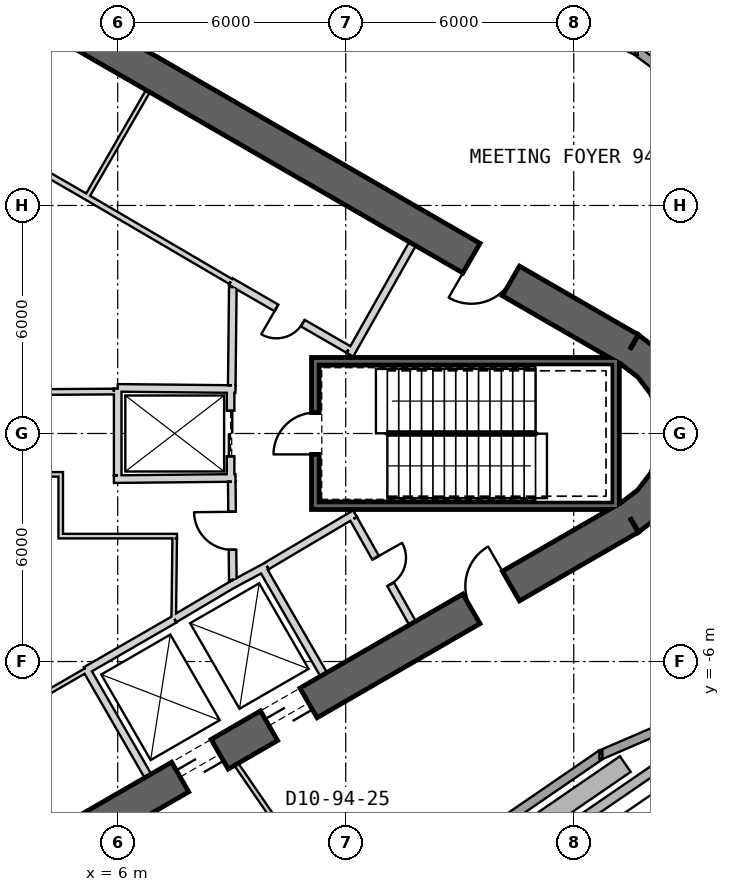
"""IFC4 building model, lengths in metres.
Left out: names, types, materials, properties, quantities, classifications, styles, units other than length and angle.
Written with IfcOpenShell. Run it as: python <this file> out.ifc"""

import sys

from ifc_helpers import new_model, si_unit, direction, frame, frame_2d, origin, place, context, subcontext, project, spatial, polyline, rectangle, outline, extrude, element, fill, save


model = new_model("IFC4")
c1 = context("Model", 3, precision=1e-05, world=origin(), true_north=direction((0.0, 1.0)))
c2 = subcontext(c1, "Body", "Model", "MODEL_VIEW")
j1 = project(units=[si_unit("LENGTHUNIT", "METRE"), si_unit("PLANEANGLEUNIT", "RADIAN")], contexts=[c1])
p1 = place(None, origin())
s1 = spatial("IfcSite", under=j1, at=p1, CompositionType="ELEMENT")
p2 = place(p1, origin())
s2 = spatial("IfcBuilding", under=s1, at=p2, CompositionType="ELEMENT")
p3 = place(p2, frame((0.0, 0.0, 415.3)))
s3 = spatial("IfcBuildingStorey", under=s2, at=p3, CompositionType="ELEMENT", Elevation=415.3)
p4 = place(p3, frame((19.475, 2.208, 0.0), z_axis=(0.0, 0.0, 1.0), x_axis=(-0.866028369851, 0.499994862586, 0.0)))
e1 = element("IfcWall", 1, at=p4, inside=s3, PredefinedType="SHEAR", context=c2, shape_type="SweptSolid", body=[
    extrude(rectangle(XDim=31.523, YDim=0.9, at=frame_2d((15.762, 0.0))), origin(), (0.0, 0.0, 1.0), 5.0),
])
p5 = place(p4, frame((3.612, 0.0, 0.0)))
e2 = element("IfcOpeningElement", 2, at=p5, cuts=e1, PredefinedType="OPENING", context=c2, shape_type="SweptSolid", body=[
    extrude(rectangle(XDim=1.2, YDim=2.4, at=frame_2d((0.6, 1.2))), frame((0.0, 0.46, 0.0), z_axis=(0.0, -1.0, 0.0), x_axis=(1.0, 0.0, 0.0)), (0.0, 0.0, 1.0), 0.92),
])
p6 = place(p4, frame((26.712, 0.0, 0.0)))
e3 = element("IfcOpeningElement", 3, at=p6, cuts=e1, PredefinedType="OPENING", context=c2, shape_type="SweptSolid", body=[
    extrude(rectangle(XDim=1.2, YDim=2.4, at=frame_2d((0.6, 1.2))), frame((0.0, 0.46, 0.0), z_axis=(0.0, -1.0, 0.0), x_axis=(1.0, 0.0, 0.0)), (0.0, 0.0, 1.0), 0.92),
])
p7 = place(p3, frame((-7.825, -17.97, 0.0), z_axis=(0.0, 0.0, 1.0), x_axis=(0.866028369851, 0.499994862586, 0.0)))
e4 = element("IfcWall", 4, at=p7, inside=s3, PredefinedType="SHEAR", context=c2, shape_type="SweptSolid", body=[
    extrude(rectangle(XDim=31.523, YDim=0.9, at=frame_2d((15.762, 0.0))), origin(), (0.0, 0.0, 1.0), 5.0),
])
p8 = place(p7, frame((17.862, 0.0, 0.0)))
e5 = element("IfcOpeningElement", 5, at=p8, cuts=e4, PredefinedType="OPENING", context=c2, shape_type="SweptSolid", body=[
    extrude(rectangle(XDim=1.2, YDim=2.4, at=frame_2d((0.6, 1.2))), frame((0.0, 0.46, 0.0), z_axis=(0.0, -1.0, 0.0), x_axis=(1.0, 0.0, 0.0)), (0.0, 0.0, 1.0), 0.92),
])
p9 = place(p7, frame((20.562, 0.0, 0.0)))
e6 = element("IfcOpeningElement", 6, at=p9, cuts=e4, PredefinedType="OPENING", context=c2, shape_type="SweptSolid", body=[
    extrude(rectangle(XDim=1.2, YDim=2.4, at=frame_2d((0.6, 1.2))), frame((0.0, 0.46, 0.0), z_axis=(0.0, -1.0, 0.0), x_axis=(1.0, 0.0, 0.0)), (0.0, 0.0, 1.0), 0.92),
])
p10 = place(p7, frame((26.712, 0.0, 0.0)))
e7 = element("IfcOpeningElement", 7, at=p10, cuts=e4, PredefinedType="OPENING", context=c2, shape_type="SweptSolid", body=[
    extrude(rectangle(XDim=1.2, YDim=2.4, at=frame_2d((0.6, 1.2))), frame((0.0, 0.46, 0.0), z_axis=(0.0, -1.0, 0.0), x_axis=(1.0, 0.0, 0.0)), (0.0, 0.0, 1.0), 0.92),
])
p11 = place(p7, frame((3.612, 0.0, 0.0)))
e8 = element("IfcOpeningElement", 8, at=p11, cuts=e4, PredefinedType="OPENING", context=c2, shape_type="SweptSolid", body=[
    extrude(rectangle(XDim=1.2, YDim=2.4, at=frame_2d((0.6, 1.2))), frame((0.0, 0.46, 0.0), z_axis=(0.0, -1.0, 0.0), x_axis=(1.0, 0.0, 0.0)), (0.0, 0.0, 1.0), 0.92),
])
p12 = place(p3, origin())
e9 = element("IfcWall", 9, at=p12, inside=s3, PredefinedType="SHEAR", context=c2, shape_type="SweptSolid", body=[
    extrude(outline(polyline([(19.7, -2.598), (20.321, -2.121), (20.798, -1.5), (21.098, -0.777), (21.2, 0.0), (21.098, 0.777), (20.798, 1.5), (20.321, 2.121), (19.7, 2.598), (19.25, 1.819), (19.685, 1.485), (20.019, 1.05), (20.229, 0.543), (20.3, 0.0), (20.229, -0.543), (20.019, -1.05), (19.685, -1.485), (19.25, -1.819), (19.7, -2.598)])), origin(), (0.0, 0.0, 1.0), 5.0),
])
p13 = place(p3, frame((26.079, 5.284, 0.0), z_axis=(0.0, 0.0, 1.0), x_axis=(-0.801990053173, 0.597337387589, 0.0)))
e10 = element("IfcWall", 10, at=p13, inside=s3, PredefinedType="SOLIDWALL", context=c2, shape_type="SweptSolid", body=[
    extrude(rectangle(XDim=8.02, YDim=0.24, at=frame_2d((4.01, 0.0))), origin(), (0.0, 0.0, 1.0), 4.75),
])
p14 = place(p3, frame((19.647, 10.075, 0.0), z_axis=(0.0, 0.0, 1.0), x_axis=(-0.902321568676, 0.431063552974, 0.0)))
e11 = element("IfcWall", 11, at=p14, inside=s3, PredefinedType="SOLIDWALL", context=c2, shape_type="SweptSolid", body=[
    extrude(rectangle(XDim=8.024, YDim=0.24, at=frame_2d((4.012, 0.0))), origin(), (0.0, 0.0, 1.0), 4.75),
])
p15 = place(p3, frame((-1.098, -22.052, 0.0), z_axis=(0.0, 0.0, 1.0), x_axis=(0.824476827337, 0.565895715821, 0.0)))
e12 = element("IfcWall", 12, at=p15, inside=s3, PredefinedType="SOLIDWALL", context=c2, shape_type="SweptSolid", body=[
    extrude(rectangle(XDim=24.031, YDim=0.24, at=frame_2d((12.016, 0.0))), origin(), (0.0, 0.0, 1.0), 4.75),
])
p16 = place(p3, frame((18.716, -8.453, 0.0), z_axis=(0.0, 0.0, 1.0), x_axis=(0.91830312374, 0.395877977323, 0.0)))
e13 = element("IfcWall", 13, at=p16, inside=s3, PredefinedType="SOLIDWALL", context=c2, shape_type="SweptSolid", body=[
    extrude(rectangle(XDim=8.03, YDim=0.24, at=frame_2d((4.015, 0.0))), origin(), (0.0, 0.0, 1.0), 4.75),
])
p17 = place(p3, frame((20.109, -8.849, 0.04), z_axis=(0.0, 0.0, 1.0), x_axis=(-0.824476642241, -0.565895985494, 0.0)))
e14 = element("IfcWall", 14, at=p17, inside=s3, PredefinedType="PARAPET", context=c2, shape_type="SweptSolid", body=[
    extrude(rectangle(XDim=26.04, YDim=0.25, at=frame_2d((13.02, 0.0))), origin(), (0.0, 0.0, 1.0), 1.2),
])
p18 = place(p3, frame((19.357, -8.698, 0.04), z_axis=(0.0, 0.0, 1.0), x_axis=(-0.824477152259, -0.565895242428, 0.0)))
e15 = element("IfcWall", 15, at=p18, inside=s3, PredefinedType="PARAPET", context=c2, shape_type="SweptSolid", body=[
    extrude(rectangle(XDim=24.864, YDim=0.5, at=frame_2d((12.432, 0.0))), origin(), (0.0, 0.0, 1.0), 0.6),
])
p19 = place(p3, frame((6.795, -9.01, 0.0), z_axis=(0.0, 0.0, 1.0), x_axis=(-0.499984717929, 0.866034226713, 0.0)))
e16 = element("IfcWall", 16, at=p19, inside=s3, PredefinedType="PLUMBINGWALL", context=c2, shape_type="SweptSolid", body=[
    extrude(rectangle(XDim=3.25, YDim=0.2, at=frame_2d((1.625, 0.0))), origin(), (0.0, 0.0, 1.0), 4.75),
])
p20 = place(p3, frame((5.159, -6.236, 0.0), z_axis=(0.0, 0.0, 1.0), x_axis=(0.866036505625, 0.499980770555, 0.0)))
e17 = element("IfcWall", 17, at=p20, inside=s3, PredefinedType="PLUMBINGWALL", context=c2, shape_type="SweptSolid", body=[
    extrude(rectangle(XDim=2.7, YDim=0.2, at=frame_2d((1.35, 0.0))), origin(), (0.0, 0.0, 1.0), 4.75),
])
p21 = place(p3, frame((9.795, -3.525, 0.0), z_axis=(0.0, 0.0, 1.0), x_axis=(0.499984717929, -0.866034226713, 0.0)))
e18 = element("IfcWall", 18, at=p21, inside=s3, PredefinedType="PLUMBINGWALL", context=c2, shape_type="SweptSolid", body=[
    extrude(rectangle(XDim=3.25, YDim=0.2, at=frame_2d((1.625, 0.0))), origin(), (0.0, 0.0, 1.0), 4.75),
])
p22 = place(p3, frame((8.974, -3.999, 0.0), z_axis=(0.0, 0.0, 1.0), x_axis=(0.880907015104, 0.473289373154, 0.0)))
e19 = element("IfcWall", 19, at=p22, inside=s3, PredefinedType="PLUMBINGWALL", context=c2, shape_type="SweptSolid", body=[
    extrude(rectangle(XDim=1.078, YDim=0.2, at=frame_2d((0.539, 0.0))), origin(), (0.0, 0.0, 1.0), 4.75),
])
p23 = place(p3, frame((7.493, -4.878, 0.0), z_axis=(0.0, 0.0, 1.0), x_axis=(0.859981807212, 0.510324691999, 0.0)))
e20 = element("IfcWall", 20, at=p23, inside=s3, PredefinedType="PLUMBINGWALL", context=c2, shape_type="SweptSolid", body=[
    extrude(rectangle(XDim=1.845, YDim=0.2, at=frame_2d((0.922, 0.0))), origin(), (0.0, 0.0, 1.0), 4.75),
])
p24 = place(p3, frame((19.2, 1.9, -0.25), z_axis=(0.0, 0.0, 1.0), x_axis=(-1.0, 0.0, 0.0)))
e21 = element("IfcWall", 21, at=p24, inside=s3, PredefinedType="SHEAR", context=c2, shape_type="SweptSolid", body=[
    extrude(rectangle(XDim=8.1, YDim=0.2, at=frame_2d((4.05, 0.0))), origin(), (0.0, 0.0, 1.0), 5.0),
])
p25 = place(p3, frame((19.1, -2.0, -0.25), z_axis=(0.0, 0.0, 1.0), x_axis=(0.0, 1.0, 0.0)))
e22 = element("IfcWall", 22, at=p25, inside=s3, PredefinedType="SHEAR", context=c2, shape_type="SweptSolid", body=[
    extrude(rectangle(XDim=3.8, YDim=0.2, at=frame_2d((1.9, 0.0))), origin(), (0.0, 0.0, 1.0), 5.0),
])
p26 = place(p3, frame((11.1, -1.9, -0.25), z_axis=(0.0, 0.0, 1.0), x_axis=(1.0, 0.0, 0.0)))
e23 = element("IfcWall", 23, at=p26, inside=s3, PredefinedType="SHEAR", context=c2, shape_type="SweptSolid", body=[
    extrude(rectangle(XDim=7.9, YDim=0.2, at=frame_2d((3.95, 0.0))), origin(), (0.0, 0.0, 1.0), 5.0),
])
p27 = place(p3, frame((11.2, -1.8, -0.25), z_axis=(0.0, 0.0, 1.0), x_axis=(0.0, 1.0, 0.0)))
e24 = element("IfcWall", 24, at=p27, inside=s3, PredefinedType="SHEAR", context=c2, shape_type="SweptSolid", body=[
    extrude(rectangle(XDim=3.6, YDim=0.2, at=frame_2d((1.8, 0.0))), origin(), (0.0, 0.0, 1.0), 5.0),
])
p28 = place(p27, frame((1.25, 0.0, 0.25)))
e25 = element("IfcOpeningElement", 25, at=p28, cuts=e24, PredefinedType="OPENING", context=c2, shape_type="SweptSolid", body=[
    extrude(rectangle(XDim=1.1, YDim=2.1, at=frame_2d((0.55, 1.05))), frame((0.0, 0.11, 0.0), z_axis=(0.0, -1.0, 0.0), x_axis=(1.0, 0.0, 0.0)), (0.0, 0.0, 1.0), 0.22),
])
p29 = place(p3, frame((8.97, 1.2, 0.0), z_axis=(0.0, 0.0, 1.0), x_axis=(0.0, -1.0, 0.0)))
e26 = element("IfcWall", 26, at=p29, inside=s3, PredefinedType="PLUMBINGWALL", context=c2, shape_type="SweptSolid", body=[
    extrude(rectangle(XDim=2.4, YDim=0.2, at=frame_2d((1.2, 0.0))), origin(), (0.0, 0.0, 1.0), 4.75),
])
p30 = place(p29, frame((0.6, 0.0, 0.0)))
e27 = element("IfcOpeningElement", 27, at=p30, cuts=e26, PredefinedType="OPENING", context=c2, shape_type="SweptSolid", body=[
    extrude(rectangle(XDim=1.2, YDim=2.4, at=frame_2d((0.6, 1.2))), frame((0.0, 0.11, 0.0), z_axis=(0.0, -1.0, 0.0), x_axis=(1.0, 0.0, 0.0)), (0.0, 0.0, 1.0), 0.22),
])
p31 = place(p3, frame((6.0, 1.2, 0.0), z_axis=(0.0, 0.0, 1.0), x_axis=(0.999949988, -0.010001074852, 0.0)))
e28 = element("IfcWall", 28, at=p31, inside=s3, PredefinedType="PLUMBINGWALL", context=c2, shape_type="SweptSolid", body=[
    extrude(rectangle(XDim=3.1, YDim=0.2, at=frame_2d((1.55, 0.0))), origin(), (0.0, 0.0, 1.0), 4.75),
])
p32 = place(p3, frame((5.9, -1.201, 0.0), z_axis=(0.0, 0.0, 1.0), x_axis=(0.999950064753, 0.009993397809, 0.0)))
e29 = element("IfcWall", 29, at=p32, inside=s3, PredefinedType="PLUMBINGWALL", context=c2, shape_type="SweptSolid", body=[
    extrude(rectangle(XDim=3.2, YDim=0.2, at=frame_2d((1.6, 0.0))), origin(), (0.0, 0.0, 1.0), 4.75),
])
p33 = place(p3, frame((6.0, -1.1, 0.0), z_axis=(0.0, 0.0, 1.0), x_axis=(0.0, 1.0, 0.0)))
e30 = element("IfcWall", 30, at=p33, inside=s3, PredefinedType="PLUMBINGWALL", context=c2, shape_type="SweptSolid", body=[
    extrude(rectangle(XDim=2.28, YDim=0.2, at=frame_2d((1.14, 0.0))), origin(), (0.0, 0.0, 1.0), 4.75),
])
p34 = place(p3, frame((6.795, 9.01, 0.0), z_axis=(0.0, 0.0, 1.0), x_axis=(-0.499984717929, -0.866034226713, 0.0)))
e31 = element("IfcWall", 31, at=p34, inside=s3, PredefinedType="PARTITIONING", context=c2, shape_type="SweptSolid", body=[
    extrude(rectangle(XDim=3.25, YDim=0.12, at=frame_2d((1.625, 0.0))), origin(), (0.0, 0.0, 1.0), 4.75),
])
p35 = place(p3, frame((12.11, 2.073, 0.0), z_axis=(0.0, 0.0, 1.0), x_axis=(0.49196600604, 0.870614408852, 0.0)))
e32 = element("IfcWall", 32, at=p35, inside=s3, PredefinedType="PARTITIONING", context=c2, shape_type="SweptSolid", body=[
    extrude(rectangle(XDim=3.35, YDim=0.2, at=frame_2d((1.675, 0.0))), origin(), (0.0, 0.0, 1.0), 4.75),
])
p36 = place(p3, frame((8.974, 3.999, 0.0), z_axis=(0.0, 0.0, 1.0), x_axis=(0.86601284211, -0.500021756827, 0.0)))
e33 = element("IfcWall", 33, at=p36, inside=s3, PredefinedType="PARTITIONING", context=c2, shape_type="SweptSolid", body=[
    extrude(rectangle(XDim=3.577, YDim=0.2, at=frame_2d((1.789, 0.0))), origin(), (0.0, 0.0, 1.0), 4.75),
])
p37 = place(p36, frame((1.389, 0.0, 0.0)))
e34 = element("IfcOpeningElement", 34, at=p37, cuts=e33, PredefinedType="OPENING", context=c2, shape_type="SweptSolid", body=[
    extrude(rectangle(XDim=0.8, YDim=2.1, at=frame_2d((0.4, 1.05))), frame((0.0, 0.11, 0.0), z_axis=(0.0, -1.0, 0.0), x_axis=(1.0, 0.0, 0.0)), (0.0, 0.0, 1.0), 0.22),
])
p38 = place(p3, frame((8.974, 3.999, 0.0), z_axis=(0.0, 0.0, 1.0), x_axis=(-0.862665579, 0.505774751059, 0.0)))
e35 = element("IfcWall", 35, at=p38, inside=s3, PredefinedType="PLUMBINGWALL", context=c2, shape_type="SweptSolid", body=[
    extrude(rectangle(XDim=4.423, YDim=0.15, at=frame_2d((2.211, 0.0))), origin(), (0.0, 0.0, 1.0), 4.75),
])
p39 = place(p3, frame((5.159, 6.236, 0.0), z_axis=(0.0, 0.0, 1.0), x_axis=(-0.866028230842, 0.499995103361, 0.0)))
e36 = element("IfcWall", 36, at=p39, inside=s3, PredefinedType="PLUMBINGWALL", context=c2, shape_type="SweptSolid", body=[
    extrude(rectangle(XDim=5.4, YDim=0.15, at=frame_2d((2.7, 0.0))), origin(), (0.0, 0.0, 1.0), 4.75),
])
p40 = place(p39, frame((2.3, 0.0, 0.0)))
e37 = element("IfcOpeningElement", 37, at=p40, cuts=e36, PredefinedType="OPENING", context=c2, shape_type="SweptSolid", body=[
    extrude(rectangle(XDim=0.8, YDim=2.1, at=frame_2d((0.4, 1.05))), frame((0.0, 0.085, 0.0), z_axis=(0.0, -1.0, 0.0), x_axis=(1.0, 0.0, 0.0)), (0.0, 0.0, 1.0), 0.17),
])
p41 = place(p3, frame((0.483, -8.936, 0.0), z_axis=(0.0, 0.0, 1.0), x_axis=(0.866028230842, 0.499995103361, 0.0)))
e38 = element("IfcWall", 38, at=p41, inside=s3, PredefinedType="PARTITIONING", context=c2, shape_type="SweptSolid", body=[
    extrude(rectangle(XDim=5.4, YDim=0.12, at=frame_2d((2.7, 0.0))), origin(), (0.0, 0.0, 1.0), 4.75),
])
p42 = place(p41, frame((2.3, 0.0, 0.0)))
e39 = element("IfcOpeningElement", 39, at=p42, cuts=e38, PredefinedType="OPENING", context=c2, shape_type="SweptSolid", body=[
    extrude(rectangle(XDim=0.8, YDim=2.1, at=frame_2d((0.4, 1.05))), frame((0.0, 0.07, 0.0), z_axis=(0.0, -1.0, 0.0), x_axis=(1.0, 0.0, 0.0)), (0.0, 0.0, 1.0), 0.14),
])
p43 = place(p3, frame((12.245, -2.109, 0.0), z_axis=(0.0, 0.0, 1.0), x_axis=(-0.860414880418, -0.509594185166, 0.0)))
e40 = element("IfcWall", 40, at=p43, inside=s3, PredefinedType="PARTITIONING", context=c2, shape_type="SweptSolid", body=[
    extrude(rectangle(XDim=2.7, YDim=0.2, at=frame_2d((1.35, 0.0))), origin(), (0.0, 0.0, 1.0), 4.75),
])
p44 = place(p3, frame((13.758, -4.99, 0.0), z_axis=(0.0, 0.0, 1.0), x_axis=(-0.491993409184, 0.87059892334, 0.0)))
e41 = element("IfcWall", 41, at=p44, inside=s3, PredefinedType="PARTITIONING", context=c2, shape_type="SweptSolid", body=[
    extrude(rectangle(XDim=3.15, YDim=0.2, at=frame_2d((1.575, 0.0))), origin(), (0.0, 0.0, 1.0), 4.75),
])
p45 = place(p44, frame((1.175, 0.0, 0.0)))
e42 = element("IfcOpeningElement", 42, at=p45, cuts=e41, PredefinedType="OPENING", context=c2, shape_type="SweptSolid", body=[
    extrude(rectangle(XDim=0.8, YDim=2.1, at=frame_2d((0.4, 1.05))), frame((0.0, 0.11, 0.0), z_axis=(0.0, -1.0, 0.0), x_axis=(1.0, 0.0, 0.0)), (0.0, 0.0, 1.0), 0.22),
])
p46 = place(p3, frame((9.001, 1.27, 0.0), z_axis=(0.0, 0.0, 1.0), x_axis=(0.010780534828, 0.999941888346, 0.0)))
e43 = element("IfcWall", 43, at=p46, inside=s3, PredefinedType="PARTITIONING", context=c2, shape_type="SweptSolid", body=[
    extrude(rectangle(XDim=2.582, YDim=0.2, at=frame_2d((1.291, 0.0))), origin(), (0.0, 0.0, 1.0), 4.75),
])
p47 = place(p3, frame((9.029, -3.851, 0.0), z_axis=(0.0, 0.0, 1.0), x_axis=(-0.010783593937, 0.99994185536, 0.0)))
e44 = element("IfcWall", 44, at=p47, inside=s3, PredefinedType="PARTITIONING", context=c2, shape_type="SweptSolid", body=[
    extrude(rectangle(XDim=2.581, YDim=0.2, at=frame_2d((1.291, 0.0))), origin(), (0.0, 0.0, 1.0), 4.75),
])
p48 = place(p47, frame((0.791, 0.0, 0.0)))
e45 = element("IfcOpeningElement", 45, at=p48, cuts=e44, PredefinedType="OPENING", context=c2, shape_type="SweptSolid", body=[
    extrude(rectangle(XDim=1.0, YDim=2.1, at=frame_2d((0.5, 1.05))), frame((0.0, 0.11, 0.0), z_axis=(0.0, -1.0, 0.0), x_axis=(1.0, 0.0, 0.0)), (0.0, 0.0, 1.0), 0.22),
])
p49 = place(p3, frame((1.388, 1.074, 0.0), z_axis=(0.0, 0.0, 1.0), x_axis=(0.99997856967, 0.006546770205, 0.0)))
e46 = element("IfcWall", 46, at=p49, inside=s3, PredefinedType="PLUMBINGWALL", context=c2, shape_type="SweptSolid", body=[
    extrude(rectangle(XDim=4.512, YDim=0.15, at=frame_2d((2.256, 0.0))), origin(), (0.0, 0.0, 1.0), 4.75),
])
p50 = place(p49, frame((1.92, 0.0, 0.0)))
e47 = element("IfcOpeningElement", 47, at=p50, cuts=e46, PredefinedType="OPENING", context=c2, shape_type="SweptSolid", body=[
    extrude(rectangle(XDim=0.8, YDim=2.1, at=frame_2d((0.4, 1.05))), frame((0.0, 0.085, 0.0), z_axis=(0.0, -1.0, 0.0), x_axis=(1.0, 0.0, 0.0)), (0.0, 0.0, 1.0), 0.17),
])
p51 = place(p3, frame((4.56, -1.075, 0.0), z_axis=(0.0, 0.0, 1.0), x_axis=(-1.0, 0.0, 0.0)))
e48 = element("IfcWall", 48, at=p51, inside=s3, PredefinedType="PARTITIONING", context=c2, shape_type="SweptSolid", body=[
    extrude(rectangle(XDim=3.026, YDim=0.12, at=frame_2d((1.513, 0.0))), origin(), (0.0, 0.0, 1.0), 4.75),
])
p52 = place(p3, frame((4.5, -2.76, 0.0), z_axis=(0.0, 0.0, 1.0), x_axis=(0.0, 1.0, 0.0)))
e49 = element("IfcWall", 49, at=p52, inside=s3, PredefinedType="PARTITIONING", context=c2, shape_type="SweptSolid", body=[
    extrude(rectangle(XDim=1.625, YDim=0.12, at=frame_2d((0.812, 0.0))), origin(), (0.0, 0.0, 1.0), 4.75),
])
p53 = place(p3, frame((7.56, -2.7, 0.0), z_axis=(0.0, 0.0, 1.0), x_axis=(-1.0, 0.0, 0.0)))
e50 = element("IfcWall", 50, at=p53, inside=s3, PredefinedType="PARTITIONING", context=c2, shape_type="SweptSolid", body=[
    extrude(rectangle(XDim=3.0, YDim=0.12, at=frame_2d((1.5, 0.0))), origin(), (0.0, 0.0, 1.0), 4.75),
])
p54 = place(p3, frame((7.475, -4.865, 0.0), z_axis=(0.0, 0.0, 1.0), x_axis=(0.011716133148, 0.999931363757, 0.0)))
e51 = element("IfcWall", 51, at=p54, inside=s3, PredefinedType="PARTITIONING", context=c2, shape_type="SweptSolid", body=[
    extrude(rectangle(XDim=2.105, YDim=0.12, at=frame_2d((1.052, 0.0))), origin(), (0.0, 0.0, 1.0), 4.75),
])
p55 = place(p3, frame((12.004, -12.907, 0.0), z_axis=(0.0, 0.0, 1.0), x_axis=(-0.565849521663, 0.824508531693, 0.0)))
e52 = element("IfcWall", 52, at=p55, inside=s3, PredefinedType="PARTITIONING", context=c2, shape_type="SweptSolid", body=[
    extrude(rectangle(XDim=5.096, YDim=0.12, at=frame_2d((2.548, 0.0))), origin(), (0.0, 0.0, 1.0), 4.75),
])
p56 = place(p55, frame((2.0, 0.0, 0.0)))
e53 = element("IfcOpeningElement", 53, at=p56, cuts=e52, PredefinedType="OPENING", context=c2, shape_type="SweptSolid", body=[
    extrude(rectangle(XDim=1.0, YDim=2.1, at=frame_2d((0.5, 1.05))), frame((0.0, 0.07, 0.0), z_axis=(0.0, -1.0, 0.0), x_axis=(1.0, 0.0, 0.0)), (0.0, 0.0, 1.0), 0.14),
])
p57 = place(p28, origin())
e54 = element("IfcDoor", 54, at=p57, inside=s3, OperationType="SINGLE_SWING_LEFT", PredefinedType="USERDEFINED", context=c2, shape_type="SweptSolid", body=[
    extrude(rectangle(XDim=1.1, YDim=2.1, at=frame_2d((0.55, 1.05))), frame((0.0, 0.025, 0.0), z_axis=(0.0, -1.0, 0.0), x_axis=(1.0, 0.0, 0.0)), (0.0, 0.0, 1.0), 0.05),
])
fill(e25, e54)
p58 = place(p48, origin())
e55 = element("IfcDoor", 55, at=p58, inside=s3, OperationType="SINGLE_SWING_RIGHT", PredefinedType="USERDEFINED", context=c2, shape_type="SweptSolid", body=[
    extrude(rectangle(XDim=1.0, YDim=2.1, at=frame_2d((0.5, 1.05))), frame((0.0, 0.025, 0.0), z_axis=(0.0, -1.0, 0.0), x_axis=(1.0, 0.0, 0.0)), (0.0, 0.0, 1.0), 0.05),
])
fill(e45, e55)
p59 = place(p30, origin())
e56 = element("IfcDoor", 56, at=p59, inside=s3, OperationType="SLIDING_TO_LEFT", PredefinedType="USERDEFINED", context=c2, shape_type="SweptSolid", body=[
    extrude(rectangle(XDim=1.2, YDim=2.4, at=frame_2d((0.6, 1.2))), frame((0.0, 0.025, 0.0), z_axis=(0.0, -1.0, 0.0), x_axis=(1.0, 0.0, 0.0)), (0.0, 0.0, 1.0), 0.05),
])
fill(e27, e56)
p60 = place(p37, origin())
e57 = element("IfcDoor", 57, at=p60, inside=s3, OperationType="SINGLE_SWING_LEFT", PredefinedType="USERDEFINED", context=c2, shape_type="SweptSolid", body=[
    extrude(rectangle(XDim=0.8, YDim=2.1, at=frame_2d((0.4, 1.05))), frame((0.0, 0.025, 0.0), z_axis=(0.0, -1.0, 0.0), x_axis=(1.0, 0.0, 0.0)), (0.0, 0.0, 1.0), 0.05),
])
fill(e34, e57)
p61 = place(p45, origin())
e58 = element("IfcDoor", 58, at=p61, inside=s3, OperationType="SINGLE_SWING_RIGHT", PredefinedType="USERDEFINED", context=c2, shape_type="SweptSolid", body=[
    extrude(rectangle(XDim=0.8, YDim=2.1, at=frame_2d((0.4, 1.05))), frame((0.0, 0.025, 0.0), z_axis=(0.0, -1.0, 0.0), x_axis=(1.0, 0.0, 0.0)), (0.0, 0.0, 1.0), 0.05),
])
fill(e42, e58)
p62 = place(p8, origin())
e59 = element("IfcDoor", 59, at=p62, inside=s3, OperationType="SLIDING_TO_LEFT", PredefinedType="USERDEFINED", context=c2, shape_type="SweptSolid", body=[
    extrude(rectangle(XDim=1.2, YDim=2.4, at=frame_2d((0.6, 1.2))), frame((0.0, 0.025, 0.0), z_axis=(0.0, -1.0, 0.0), x_axis=(1.0, 0.0, 0.0)), (0.0, 0.0, 1.0), 0.05),
])
fill(e5, e59)
p63 = place(p9, origin())
e60 = element("IfcDoor", 60, at=p63, inside=s3, OperationType="SLIDING_TO_LEFT", PredefinedType="USERDEFINED", context=c2, shape_type="SweptSolid", body=[
    extrude(rectangle(XDim=1.2, YDim=2.4, at=frame_2d((0.6, 1.2))), frame((0.0, 0.025, 0.0), z_axis=(0.0, -1.0, 0.0), x_axis=(1.0, 0.0, 0.0)), (0.0, 0.0, 1.0), 0.05),
])
fill(e6, e60)
p64 = place(p10, origin())
e61 = element("IfcDoor", 61, at=p64, inside=s3, OperationType="SINGLE_SWING_RIGHT", PredefinedType="USERDEFINED", context=c2, shape_type="SweptSolid", body=[
    extrude(rectangle(XDim=1.2, YDim=2.4, at=frame_2d((0.6, 1.2))), frame((0.0, 0.025, 0.0), z_axis=(0.0, -1.0, 0.0), x_axis=(1.0, 0.0, 0.0)), (0.0, 0.0, 1.0), 0.05),
])
fill(e7, e61)
p65 = place(p5, origin())
e62 = element("IfcDoor", 62, at=p65, inside=s3, OperationType="SINGLE_SWING_RIGHT", PredefinedType="USERDEFINED", context=c2, shape_type="SweptSolid", body=[
    extrude(rectangle(XDim=1.2, YDim=2.4, at=frame_2d((0.6, 1.2))), frame((0.0, 0.025, 0.0), z_axis=(0.0, -1.0, 0.0), x_axis=(1.0, 0.0, 0.0)), (0.0, 0.0, 1.0), 0.05),
])
fill(e2, e62)
save(model, sys.argv[1])
